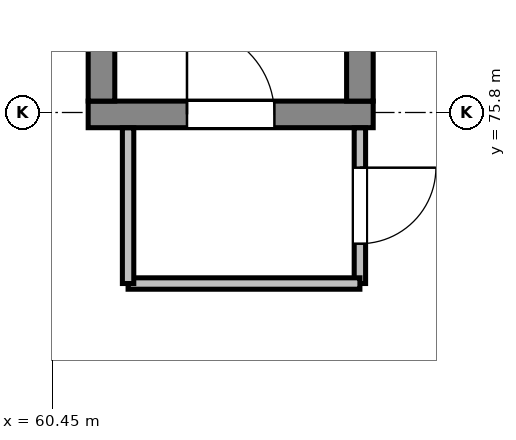
"""IFC4 building model, lengths in metres.
Left out: names, types, materials, properties, quantities, classifications, styles, units other than length and angle.
Written with IfcOpenShell. Run it as: python <this file> out.ifc"""

import sys

from ifc_helpers import new_model, si_unit, direction, frame, frame_2d, origin, place, context, subcontext, project, spatial, rectangle, extrude, element, fill, save


model = new_model("IFC4")
c1 = context("Model", 3, precision=1e-05, world=origin(), true_north=direction((0.0, 1.0)))
c2 = subcontext(c1, "Body", "Model", "MODEL_VIEW")
j1 = project(units=[si_unit("LENGTHUNIT", "METRE"), si_unit("PLANEANGLEUNIT", "RADIAN")], contexts=[c1])
p1 = place(None, origin())
s1 = spatial("IfcSite", under=j1, at=p1, CompositionType="ELEMENT")
p2 = place(p1, origin())
s2 = spatial("IfcBuilding", under=s1, at=p2, CompositionType="ELEMENT")
p3 = place(p2, frame((0.0, 0.0, 15.0)))
s3 = spatial("IfcBuildingStorey", under=s2, at=p3, CompositionType="ELEMENT", Elevation=15.0)
p4 = place(p3, frame((60.925, 75.775, 0.0), z_axis=(0.0, 0.0, 1.0), x_axis=(1.0, 0.0, 0.0)))
e1 = element("IfcWall", 1, at=p4, inside=s3, PredefinedType="SHEAR", context=c2, shape_type="SweptSolid", body=[
    extrude(rectangle(XDim=3.75, YDim=0.35, at=frame_2d((1.875, 0.0))), origin(), (0.0, 0.0, 1.0), 4.44),
])
p5 = place(p4, frame((1.3, 0.0, 0.0)))
e2 = element("IfcOpeningElement", 2, at=p5, cuts=e1, PredefinedType="OPENING", context=c2, shape_type="SweptSolid", body=[
    extrude(rectangle(XDim=1.15, YDim=2.15, at=frame_2d((0.575, 1.075))), frame((0.0, 0.185, 0.0), z_axis=(0.0, -1.0, 0.0), x_axis=(1.0, 0.0, 0.0)), (0.0, 0.0, 1.0), 0.37),
])
for number, where, z_axis, x_axis in (
    (3, (61.1, 75.95, 0.0), (0.0, 0.0, 1.0), (0.0, 1.0, 0.0)),
    (4, (64.5, 75.95, 0.0), (0.0, 0.0, 1.0), (0.0, 1.0, 0.0)),
):
    element("IfcWall", number, at=place(p3, frame(where, z_axis=z_axis, x_axis=x_axis)), inside=s3, PredefinedType="SHEAR", context=c2, shape_type="SweptSolid", body=[
        extrude(rectangle(XDim=7.275, YDim=0.35, at=frame_2d((3.638, 0.0))), origin(), (0.0, 0.0, 1.0), 4.44),
    ])
p6 = place(p3, frame((64.5, 75.598, 0.0), z_axis=(0.0, 0.0, 1.0), x_axis=(0.0, -1.0, 0.0)))
e5 = element("IfcWall", 5, at=p6, inside=s3, PredefinedType="PARTITIONING", context=c2, shape_type="SweptSolid", body=[
    extrude(rectangle(XDim=2.048, YDim=0.15, at=frame_2d((1.024, 0.0))), origin(), (0.0, 0.0, 1.0), 3.835),
])
p7 = place(p6, frame((0.524, 0.0, 0.0)))
e6 = element("IfcOpeningElement", 6, at=p7, cuts=e5, PredefinedType="OPENING", context=c2, shape_type="SweptSolid", body=[
    extrude(rectangle(XDim=1.0, YDim=2.1, at=frame_2d((0.5, 1.05))), frame((0.0, 0.085, 0.0), z_axis=(0.0, -1.0, 0.0), x_axis=(1.0, 0.0, 0.0)), (0.0, 0.0, 1.0), 0.17),
])
p8 = place(p3, frame((64.5, 73.55, 0.0), z_axis=(0.0, 0.0, 1.0), x_axis=(-1.0, 0.0, 0.0)))
e7 = element("IfcWall", 7, at=p8, inside=s3, PredefinedType="PARTITIONING", context=c2, shape_type="SweptSolid", body=[
    extrude(rectangle(XDim=3.05, YDim=0.15, at=frame_2d((1.525, 0.0))), origin(), (0.0, 0.0, 1.0), 4.195),
])
p9 = place(p3, frame((61.45, 73.55, 0.0), z_axis=(0.0, 0.0, 1.0), x_axis=(0.0, 1.0, 0.0)))
e8 = element("IfcWall", 8, at=p9, inside=s3, PredefinedType="PARTITIONING", context=c2, shape_type="SweptSolid", body=[
    extrude(rectangle(XDim=2.048, YDim=0.15, at=frame_2d((1.024, 0.0))), origin(), (0.0, 0.0, 1.0), 3.835),
])
p10 = place(p5, origin())
e9 = element("IfcDoor", 9, at=p10, inside=s3, OperationType="SINGLE_SWING_LEFT", PredefinedType="DOOR", context=c2, shape_type="SweptSolid", body=[
    extrude(rectangle(XDim=1.15, YDim=2.15, at=frame_2d((0.575, 1.075))), frame((0.0, 0.025, 0.0), z_axis=(0.0, -1.0, 0.0), x_axis=(1.0, 0.0, 0.0)), (0.0, 0.0, 1.0), 0.05),
])
fill(e2, e9)
p11 = place(p7, origin())
e10 = element("IfcDoor", 10, at=p11, inside=s3, OperationType="SINGLE_SWING_LEFT", PredefinedType="DOOR", context=c2, shape_type="SweptSolid", body=[
    extrude(rectangle(XDim=1.0, YDim=2.1, at=frame_2d((0.5, 1.05))), frame((0.0, 0.025, 0.0), z_axis=(0.0, -1.0, 0.0), x_axis=(1.0, 0.0, 0.0)), (0.0, 0.0, 1.0), 0.05),
])
fill(e6, e10)
save(model, sys.argv[1])
